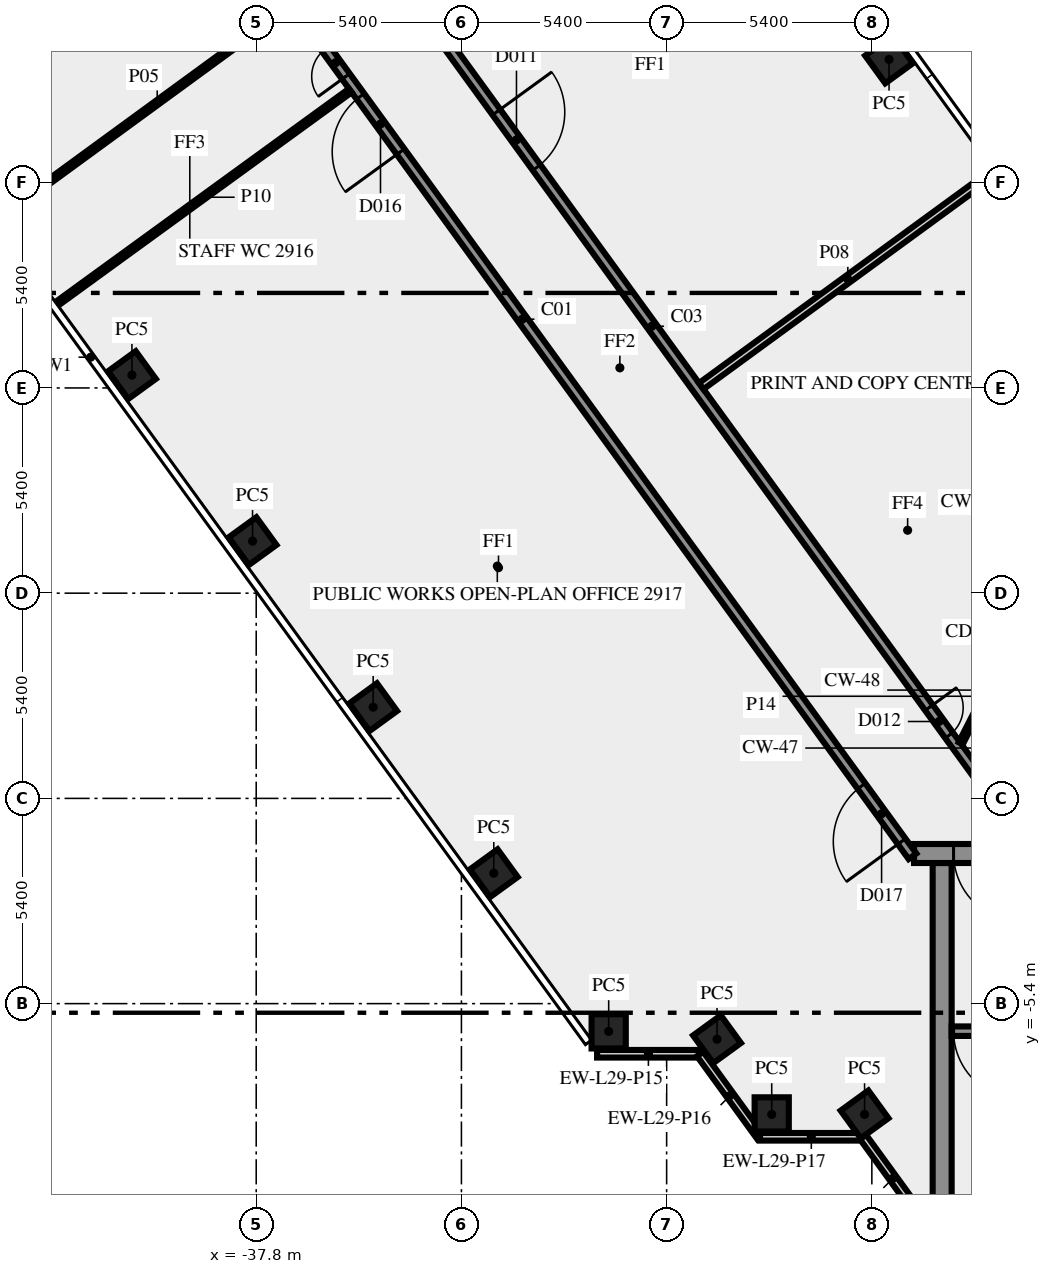
"""IFC4 building model, lengths in metres.
Left out: names, types, materials, properties, quantities, classifications, styles, units other than length and angle.
Written with IfcOpenShell. Run it as: python <this file> out.ifc"""

import sys

from ifc_helpers import new_model, si_unit, direction, frame, frame_2d, origin, origin_2d, place, context, subcontext, project, spatial, rectangle, extrude, element, fill, save


model = new_model("IFC4")
c1 = context("Model", 3, precision=1e-05, world=origin(), true_north=direction((0.0, 1.0)))
c2 = subcontext(c1, "Body", "Model", "MODEL_VIEW")
j1 = project(units=[si_unit("LENGTHUNIT", "METRE"), si_unit("PLANEANGLEUNIT", "RADIAN")], contexts=[c1])
p1 = place(None, origin())
s1 = spatial("IfcSite", under=j1, at=p1, CompositionType="ELEMENT")
p2 = place(p1, origin())
s2 = spatial("IfcBuilding", under=s1, at=p2, CompositionType="ELEMENT")
p3 = place(p2, frame((0.0, 0.0, 125.0)))
s3 = spatial("IfcBuildingStorey", under=s2, at=p3, CompositionType="ELEMENT", Elevation=125.0)
for number, where, z_axis, x_axis in (
    (1, (-21.147, 19.444, 0.0), (0.0, 0.0, 1.0), (-0.588, 0.809, 0.0)),
    (2, (-41.07, 11.137, 0.0), (0.0, 0.0, 1.0), (0.588, -0.809, 0.0)),
    (3, (-37.896, 6.769, 0.0), (0.0, 0.0, 1.0), (0.588, -0.809, 0.0)),
    (4, (-34.722, 2.4, 0.0), (0.0, 0.0, 1.0), (0.588, -0.809, 0.0)),
    (5, (-31.548, -1.969, 0.0), (0.0, 0.0, 1.0), (0.588, -0.809, 0.0)),
    (6, (-28.525, -6.13, 0.0), (0.0, 0.0, 1.0), (1.0, 0.0, 0.0)),
    (7, (-25.674, -6.337, 0.0), (0.0, 0.0, 1.0), (0.588, -0.809, 0.0)),
    (8, (-24.235, -8.315, 0.0), (0.0, 0.0, 1.0), (1.0, 0.0, 0.0)),
    (9, (-21.792, -8.315, 0.0), (0.0, 0.0, 1.0), (0.588, -0.809, 0.0)),
):
    element("IfcColumn", number, at=place(p3, frame(where, z_axis=z_axis, x_axis=x_axis)), inside=s3, PredefinedType="COLUMN", context=c2, shape_type="SweptSolid", body=[
        extrude(rectangle(XDim=0.9, YDim=0.9, at=origin_2d()), origin(), (0.0, 0.0, 1.0), 3.65),
    ])
p4 = place(p3, frame((-28.83, -6.719, 0.0), z_axis=(0.0, 0.0, 1.0), x_axis=(1.0, 0.0, 0.0)))
e10 = element("IfcWall", 10, at=p4, inside=s3, PredefinedType="SOLIDWALL", context=c2, shape_type="SweptSolid", body=[
    extrude(rectangle(XDim=2.7, YDim=0.2, at=frame_2d((1.35, 0.0))), origin(), (0.0, 0.0, 1.0), 3.65),
])
p5 = place(p3, frame((-26.12, -6.724, 0.0), z_axis=(0.0, 0.0, 1.0), x_axis=(0.587720002413, -0.809064397168, 0.0)))
e11 = element("IfcWall", 11, at=p5, inside=s3, PredefinedType="SOLIDWALL", context=c2, shape_type="SweptSolid", body=[
    extrude(rectangle(XDim=2.7, YDim=0.2, at=frame_2d((1.35, 0.0))), origin(), (0.0, 0.0, 1.0), 3.65),
])
p6 = place(p3, frame((-24.543, -8.904, 0.0), z_axis=(0.0, 0.0, 1.0), x_axis=(1.0, 0.0, 0.0)))
e12 = element("IfcWall", 12, at=p6, inside=s3, PredefinedType="SOLIDWALL", context=c2, shape_type="SweptSolid", body=[
    extrude(rectangle(XDim=2.7, YDim=0.2, at=frame_2d((1.35, 0.0))), origin(), (0.0, 0.0, 1.0), 3.65),
])
p7 = place(p3, frame((-21.833, -8.909, 0.0), z_axis=(0.0, 0.0, 1.0), x_axis=(0.587766567315, -0.809030569476, 0.0)))
e13 = element("IfcWall", 13, at=p7, inside=s3, PredefinedType="SOLIDWALL", context=c2, shape_type="SweptSolid", body=[
    extrude(rectangle(XDim=2.688, YDim=0.2, at=frame_2d((1.344, 0.0))), origin(), (0.0, 0.0, 1.0), 3.65),
])
p8 = place(p3, frame((-19.75, -10.5, 0.0), z_axis=(0.0, 0.0, 1.0), x_axis=(0.0, 1.0, 0.0)))
e14 = element("IfcWall", 14, at=p8, inside=s3, PredefinedType="SHEAR", context=c2, shape_type="SweptSolid", body=[
    extrude(rectangle(XDim=8.8, YDim=0.5, at=frame_2d((4.4, 0.0))), origin(), (0.0, 0.0, 1.0), 3.65),
])
p9 = place(p3, frame((-11.45, -6.125, 0.0), z_axis=(0.0, 0.0, 1.0), x_axis=(-1.0, 0.0, 0.0)))
e15 = element("IfcWall", 15, at=p9, inside=s3, PredefinedType="SHEAR", context=c2, shape_type="SweptSolid", body=[
    extrude(rectangle(XDim=8.05, YDim=0.25, at=frame_2d((4.025, 0.0))), origin(), (0.0, 0.0, 1.0), 3.65),
])
p10 = place(p9, frame((6.2, 0.0, 0.0)))
e16 = element("IfcOpeningElement", 16, at=p10, cuts=e15, PredefinedType="OPENING", context=c2, shape_type="SweptSolid", body=[
    extrude(rectangle(XDim=1.8, YDim=2.1, at=frame_2d((0.9, 1.05))), frame((0.0, 0.135, 0.0), z_axis=(0.0, -1.0, 0.0), x_axis=(1.0, 0.0, 0.0)), (0.0, 0.0, 1.0), 0.27),
])
p11 = place(p3, frame((20.49, -1.45, 0.0), z_axis=(0.0, 0.0, 1.0), x_axis=(-1.0, 0.0, 0.0)))
e17 = element("IfcWall", 17, at=p11, inside=s3, PredefinedType="SHEAR", context=c2, shape_type="SweptSolid", body=[
    extrude(rectangle(XDim=40.98, YDim=0.5, at=frame_2d((20.49, 0.0))), origin(), (0.0, 0.0, 1.0), 3.65),
])
p12 = place(p11, frame((38.14, 0.0, 0.0)))
e18 = element("IfcOpeningElement", 18, at=p12, cuts=e17, PredefinedType="OPENING", context=c2, shape_type="SweptSolid", body=[
    extrude(rectangle(XDim=1.8, YDim=2.1, at=frame_2d((0.9, 1.05))), frame((0.0, 0.26, 0.0), z_axis=(0.0, -1.0, 0.0), x_axis=(1.0, 0.0, 0.0)), (0.0, 0.0, 1.0), 0.52),
])
p13 = place(p11, frame((35.89, 0.0, 0.0)))
e19 = element("IfcOpeningElement", 19, at=p13, cuts=e17, PredefinedType="OPENING", context=c2, shape_type="SweptSolid", body=[
    extrude(rectangle(XDim=0.9, YDim=2.1, at=frame_2d((0.45, 1.05))), frame((0.0, 0.26, 0.0), z_axis=(0.0, -1.0, 0.0), x_axis=(1.0, 0.0, 0.0)), (0.0, 0.0, 1.0), 0.52),
])
p14 = place(p11, frame((32.94, 0.0, 0.0)))
e20 = element("IfcOpeningElement", 20, at=p14, cuts=e17, PredefinedType="OPENING", context=c2, shape_type="SweptSolid", body=[
    extrude(rectangle(XDim=0.9, YDim=2.1, at=frame_2d((0.45, 1.05))), frame((0.0, 0.26, 0.0), z_axis=(0.0, -1.0, 0.0), x_axis=(1.0, 0.0, 0.0)), (0.0, 0.0, 1.0), 0.52),
])
p15 = place(p11, frame((19.59, 0.0, 0.0)))
e21 = element("IfcOpeningElement", 21, at=p15, cuts=e17, PredefinedType="OPENING", context=c2, shape_type="SweptSolid", body=[
    extrude(rectangle(XDim=2.0, YDim=2.1, at=frame_2d((1.0, 1.05))), frame((0.0, 0.26, 0.0), z_axis=(0.0, -1.0, 0.0), x_axis=(1.0, 0.0, 0.0)), (0.0, 0.0, 1.0), 0.52),
])
p16 = place(p11, frame((7.14, 0.0, 0.0)))
e22 = element("IfcOpeningElement", 22, at=p16, cuts=e17, PredefinedType="OPENING", context=c2, shape_type="SweptSolid", body=[
    extrude(rectangle(XDim=0.9, YDim=2.1, at=frame_2d((0.45, 1.05))), frame((0.0, 0.26, 0.0), z_axis=(0.0, -1.0, 0.0), x_axis=(1.0, 0.0, 0.0)), (0.0, 0.0, 1.0), 0.52),
])
p17 = place(p11, frame((5.028, 0.0, 0.0)))
e23 = element("IfcOpeningElement", 23, at=p17, cuts=e17, PredefinedType="OPENING", context=c2, shape_type="SweptSolid", body=[
    extrude(rectangle(XDim=0.8, YDim=2.1, at=frame_2d((0.4, 1.05))), frame((0.0, 0.26, 0.0), z_axis=(0.0, -1.0, 0.0), x_axis=(1.0, 0.0, 0.0)), (0.0, 0.0, 1.0), 0.52),
])
p18 = place(p11, frame((3.452, 0.0, 0.0)))
e24 = element("IfcOpeningElement", 24, at=p18, cuts=e17, PredefinedType="OPENING", context=c2, shape_type="SweptSolid", body=[
    extrude(rectangle(XDim=0.8, YDim=2.1, at=frame_2d((0.4, 1.05))), frame((0.0, 0.26, 0.0), z_axis=(0.0, -1.0, 0.0), x_axis=(1.0, 0.0, 0.0)), (0.0, 0.0, 1.0), 0.52),
])
p19 = place(p11, frame((1.04, 0.0, 0.0)))
e25 = element("IfcOpeningElement", 25, at=p19, cuts=e17, PredefinedType="OPENING", context=c2, shape_type="SweptSolid", body=[
    extrude(rectangle(XDim=1.8, YDim=2.1, at=frame_2d((0.9, 1.05))), frame((0.0, 0.26, 0.0), z_axis=(0.0, -1.0, 0.0), x_axis=(1.0, 0.0, 0.0)), (0.0, 0.0, 1.0), 0.52),
])
p20 = place(p3, frame((-20.531, -1.523, 0.0), z_axis=(0.0, 0.0, 1.0), x_axis=(-0.587784522481, 0.809017524614, 0.0)))
e26 = element("IfcWall", 26, at=p20, inside=s3, PredefinedType="SOLIDWALL", context=c2, shape_type="SweptSolid", body=[
    extrude(rectangle(XDim=49.912, YDim=0.25, at=frame_2d((24.956, 0.0))), origin(), (0.0, 0.0, 1.0), 3.65),
])
p21 = place(p20, frame((34.816, 0.0, 0.0)))
e27 = element("IfcOpeningElement", 27, at=p21, cuts=e26, PredefinedType="OPENING", context=c2, shape_type="SweptSolid", body=[
    extrude(rectangle(XDim=0.9, YDim=2.1, at=frame_2d((0.45, 1.05))), frame((0.0, 0.135, 0.0), z_axis=(0.0, -1.0, 0.0), x_axis=(1.0, 0.0, 0.0)), (0.0, 0.0, 1.0), 0.27),
])
p22 = place(p20, frame((33.215, 0.0, 0.0)))
e28 = element("IfcOpeningElement", 28, at=p22, cuts=e26, PredefinedType="OPENING", context=c2, shape_type="SweptSolid", body=[
    extrude(rectangle(XDim=0.9, YDim=2.1, at=frame_2d((0.45, 1.05))), frame((0.0, 0.135, 0.0), z_axis=(0.0, -1.0, 0.0), x_axis=(1.0, 0.0, 0.0)), (0.0, 0.0, 1.0), 0.27),
])
p23 = place(p20, frame((22.916, 0.0, 0.0)))
e29 = element("IfcOpeningElement", 29, at=p23, cuts=e26, PredefinedType="OPENING", context=c2, shape_type="SweptSolid", body=[
    extrude(rectangle(XDim=1.8, YDim=2.1, at=frame_2d((0.9, 1.05))), frame((0.0, 0.135, 0.0), z_axis=(0.0, -1.0, 0.0), x_axis=(1.0, 0.0, 0.0)), (0.0, 0.0, 1.0), 0.27),
])
p24 = place(p20, frame((0.483, 0.0, 0.0)))
e30 = element("IfcOpeningElement", 30, at=p24, cuts=e26, PredefinedType="OPENING", context=c2, shape_type="SweptSolid", body=[
    extrude(rectangle(XDim=1.8, YDim=2.1, at=frame_2d((0.9, 1.05))), frame((0.0, 0.135, 0.0), z_axis=(0.0, -1.0, 0.0), x_axis=(1.0, 0.0, 0.0)), (0.0, 0.0, 1.0), 0.27),
])
p25 = place(p20, frame((25.365, 0.0, 0.0)))
e31 = element("IfcOpeningElement", 31, at=p25, cuts=e26, PredefinedType="OPENING", context=c2, shape_type="SweptSolid", body=[
    extrude(rectangle(XDim=0.9, YDim=2.1, at=frame_2d((0.45, 1.05))), frame((0.0, 0.135, 0.0), z_axis=(0.0, -1.0, 0.0), x_axis=(1.0, 0.0, 0.0)), (0.0, 0.0, 1.0), 0.27),
])
p26 = place(p3, frame((-37.232, 25.972, 0.0), z_axis=(0.0, 0.0, 1.0), x_axis=(0.587786323093, -0.809016216391, 0.0)))
e32 = element("IfcWall", 32, at=p26, inside=s3, PredefinedType="SOLIDWALL", context=c2, shape_type="SweptSolid", body=[
    extrude(rectangle(XDim=33.493, YDim=0.25, at=frame_2d((16.747, 0.0))), origin(), (0.0, 0.0, 1.0), 3.65),
])
p27 = place(p26, frame((9.785, 0.0, 0.0)))
e33 = element("IfcOpeningElement", 33, at=p27, cuts=e32, PredefinedType="OPENING", context=c2, shape_type="SweptSolid", body=[
    extrude(rectangle(XDim=1.8, YDim=2.1, at=frame_2d((0.9, 1.05))), frame((0.0, 0.135, 0.0), z_axis=(0.0, -1.0, 0.0), x_axis=(1.0, 0.0, 0.0)), (0.0, 0.0, 1.0), 0.27),
])
p28 = place(p26, frame((29.152, 0.0, 0.0)))
e34 = element("IfcOpeningElement", 34, at=p28, cuts=e32, PredefinedType="OPENING", context=c2, shape_type="SweptSolid", body=[
    extrude(rectangle(XDim=0.9, YDim=2.1, at=frame_2d((0.45, 1.05))), frame((0.0, 0.135, 0.0), z_axis=(0.0, -1.0, 0.0), x_axis=(1.0, 0.0, 0.0)), (0.0, 0.0, 1.0), 0.27),
])
p29 = place(p26, frame((1.335, 0.0, 0.0)))
e35 = element("IfcOpeningElement", 35, at=p29, cuts=e32, PredefinedType="OPENING", context=c2, shape_type="SweptSolid", body=[
    extrude(rectangle(XDim=0.9, YDim=2.1, at=frame_2d((0.45, 1.05))), frame((0.0, 0.135, 0.0), z_axis=(0.0, -1.0, 0.0), x_axis=(1.0, 0.0, 0.0)), (0.0, 0.0, 1.0), 0.27),
])
p30 = place(p3, frame((-43.876, 15.773, 0.0), z_axis=(0.0, 0.0, 1.0), x_axis=(0.807597163234, 0.589734535139, 0.0)))
e36 = element("IfcWall", 36, at=p30, inside=s3, PredefinedType="PARTITIONING", context=c2, shape_type="SweptSolid", body=[
    extrude(rectangle(XDim=8.595, YDim=0.12, at=frame_2d((4.298, 0.0))), origin(), (0.0, 0.0, 1.0), 3.65),
])
p31 = place(p3, frame((-26.089, 10.848, 0.0), z_axis=(0.0, 0.0, 1.0), x_axis=(0.807661302092, 0.589646691759, 0.0)))
e37 = element("IfcWall", 37, at=p31, inside=s3, PredefinedType="SOLIDWALL", context=c2, shape_type="SweptSolid", body=[
    extrude(rectangle(XDim=9.55, YDim=0.2, at=frame_2d((4.775, 0.0))), origin(), (0.0, 0.0, 1.0), 2.75),
])
p32 = place(p3, frame((-35.324, 18.625, 0.0), z_axis=(0.0, 0.0, 1.0), x_axis=(-0.808998008689, -0.58781138296, 0.0)))
e38 = element("IfcWall", 38, at=p32, inside=s3, PredefinedType="PARTITIONING", context=c2, shape_type="SweptSolid", body=[
    extrude(rectangle(XDim=9.55, YDim=0.12, at=frame_2d((4.775, 0.0))), origin(), (0.0, 0.0, 1.0), 2.75),
])
p33 = place(p3, frame((-19.261, 1.45, 0.0), z_axis=(0.0, 0.0, 1.0), x_axis=(0.453950796792, 0.891026752736, 0.0)))
e39 = element("IfcWall", 39, at=p33, inside=s3, PredefinedType="PARTITIONING", context=c2, shape_type="SweptSolid", body=[
    extrude(rectangle(XDim=2.778, YDim=0.12, at=frame_2d((1.389, 0.0))), origin(), (0.0, 0.0, 1.0), 3.65),
])
p34 = place(p10, origin())
e40 = element("IfcDoor", 40, at=p34, inside=s3, OperationType="DOUBLE_DOOR_SINGLE_SWING", PredefinedType="DOOR", context=c2, shape_type="SweptSolid", body=[
    extrude(rectangle(XDim=1.8, YDim=2.1, at=frame_2d((0.9, 1.05))), frame((0.0, 0.025, 0.0), z_axis=(0.0, -1.0, 0.0), x_axis=(1.0, 0.0, 0.0)), (0.0, 0.0, 1.0), 0.05),
])
fill(e16, e40)
p35 = place(p12, origin())
e41 = element("IfcDoor", 41, at=p35, inside=s3, OperationType="DOUBLE_DOOR_SINGLE_SWING", PredefinedType="DOOR", context=c2, shape_type="SweptSolid", body=[
    extrude(rectangle(XDim=1.8, YDim=2.1, at=frame_2d((0.9, 1.05))), frame((0.0, 0.025, 0.0), z_axis=(0.0, -1.0, 0.0), x_axis=(1.0, 0.0, 0.0)), (0.0, 0.0, 1.0), 0.05),
])
fill(e18, e41)
p36 = place(p27, origin())
e42 = element("IfcDoor", 42, at=p36, inside=s3, OperationType="DOUBLE_DOOR_SINGLE_SWING", PredefinedType="DOOR", context=c2, shape_type="SweptSolid", body=[
    extrude(rectangle(XDim=1.8, YDim=2.1, at=frame_2d((0.9, 1.05))), frame((0.0, 0.025, 0.0), z_axis=(0.0, -1.0, 0.0), x_axis=(1.0, 0.0, 0.0)), (0.0, 0.0, 1.0), 0.05),
])
fill(e33, e42)
p37 = place(p23, origin())
e43 = element("IfcDoor", 43, at=p37, inside=s3, OperationType="DOUBLE_DOOR_SINGLE_SWING", PredefinedType="DOOR", context=c2, shape_type="SweptSolid", body=[
    extrude(rectangle(XDim=1.8, YDim=2.1, at=frame_2d((0.9, 1.05))), frame((0.0, 0.025, 0.0), z_axis=(0.0, -1.0, 0.0), x_axis=(1.0, 0.0, 0.0)), (0.0, 0.0, 1.0), 0.05),
])
fill(e29, e43)
p38 = place(p24, origin())
e44 = element("IfcDoor", 44, at=p38, inside=s3, OperationType="DOUBLE_DOOR_SINGLE_SWING", PredefinedType="DOOR", context=c2, shape_type="SweptSolid", body=[
    extrude(rectangle(XDim=1.8, YDim=2.1, at=frame_2d((0.9, 1.05))), frame((0.0, 0.025, 0.0), z_axis=(0.0, -1.0, 0.0), x_axis=(1.0, 0.0, 0.0)), (0.0, 0.0, 1.0), 0.05),
])
fill(e30, e44)
p39 = place(p28, origin())
e45 = element("IfcDoor", 45, at=p39, inside=s3, OperationType="SINGLE_SWING_RIGHT", PredefinedType="DOOR", context=c2, shape_type="SweptSolid", body=[
    extrude(rectangle(XDim=0.9, YDim=2.1, at=frame_2d((0.45, 1.05))), frame((0.0, 0.025, 0.0), z_axis=(0.0, -1.0, 0.0), x_axis=(1.0, 0.0, 0.0)), (0.0, 0.0, 1.0), 0.05),
])
fill(e34, e45)
p40 = place(p25, origin())
e46 = element("IfcDoor", 46, at=p40, inside=s3, OperationType="SINGLE_SWING_LEFT", PredefinedType="DOOR", context=c2, shape_type="SweptSolid", body=[
    extrude(rectangle(XDim=0.9, YDim=2.1, at=frame_2d((0.45, 1.05))), frame((0.0, 0.025, 0.0), z_axis=(0.0, -1.0, 0.0), x_axis=(1.0, 0.0, 0.0)), (0.0, 0.0, 1.0), 0.05),
])
fill(e31, e46)
save(model, sys.argv[1])
